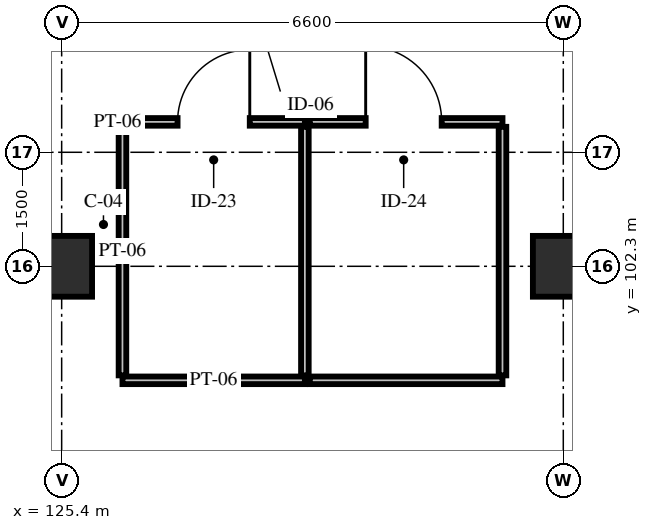
"""IFC4 building model, lengths in metres.
Left out: names, types, materials, properties, quantities, classifications, styles, units other than length and angle.
Written with IfcOpenShell. Run it as: python <this file> out.ifc"""

import sys

from ifc_helpers import new_model, si_unit, direction, frame, frame_2d, origin, origin_2d, place, context, subcontext, project, spatial, rectangle, extrude, element, fill, save


model = new_model("IFC4")
c1 = context("Model", 3, precision=1e-05, world=origin(), true_north=direction((0.0, 1.0)))
c2 = subcontext(c1, "Body", "Model", "MODEL_VIEW")
j1 = project(units=[si_unit("LENGTHUNIT", "METRE"), si_unit("PLANEANGLEUNIT", "RADIAN")], contexts=[c1])
p1 = place(None, origin())
s1 = spatial("IfcSite", under=j1, at=p1, CompositionType="ELEMENT")
p2 = place(p1, origin())
s2 = spatial("IfcBuilding", under=s1, at=p2, CompositionType="ELEMENT")
p3 = place(p2, frame((0.0, 0.0, 10.2)))
s3 = spatial("IfcBuildingStorey", under=s2, at=p3, CompositionType="ELEMENT", Elevation=10.2)
for number, where, z_axis, x_axis in (
    (1, (125.4, 102.3, 0.0), (0.0, 0.0, 1.0), (1.0, 0.0, 0.0)),
    (2, (132.0, 102.3, 0.0), (0.0, 0.0, 1.0), (1.0, 0.0, 0.0)),
):
    element("IfcColumn", number, at=place(p3, frame(where, z_axis=z_axis, x_axis=x_axis)), inside=s3, PredefinedType="COLUMN", context=c2, shape_type="SweptSolid", body=[
        extrude(rectangle(XDim=0.8, YDim=0.8, at=origin_2d()), origin(), (0.0, 0.0, 1.0), 4.8),
    ])
p4 = place(p3, frame((126.2, 100.8, 0.0), z_axis=(0.0, 0.0, 1.0), x_axis=(1.0, 0.0, 0.0)))
e3 = element("IfcWall", 3, at=p4, inside=s3, PredefinedType="PARTITIONING", context=c2, shape_type="SweptSolid", body=[
    extrude(rectangle(XDim=2.4, YDim=0.1, at=frame_2d((1.2, 0.0))), origin(), (0.0, 0.0, 1.0), 4.44),
])
p5 = place(p3, frame((126.2, 104.2, 0.0), z_axis=(0.0, 0.0, 1.0), x_axis=(1.0, 0.0, 0.0)))
e4 = element("IfcWall", 4, at=p5, inside=s3, PredefinedType="PARTITIONING", context=c2, shape_type="SweptSolid", body=[
    extrude(rectangle(XDim=2.4, YDim=0.1, at=frame_2d((1.2, 0.0))), origin(), (0.0, 0.0, 1.0), 4.245),
])
p6 = place(p5, frame((0.725, 0.0, 0.0)))
e5 = element("IfcOpeningElement", 5, at=p6, cuts=e4, PredefinedType="OPENING", context=c2, shape_type="SweptSolid", body=[
    extrude(rectangle(XDim=0.95, YDim=2.15, at=frame_2d((0.475, 1.075))), frame((0.0, 0.065, 0.0), z_axis=(0.0, -1.0, 0.0), x_axis=(1.0, 0.0, 0.0)), (0.0, 0.0, 1.0), 0.13),
])
for number, where, z_axis, x_axis in (
    (6, (126.2, 100.865, 0.0), (0.0, 0.0, 1.0), (0.0, 1.0, 0.0)),
    (7, (128.6, 100.865, 0.0), (0.0, 0.0, 1.0), (0.0, 1.0, 0.0)),
):
    element("IfcWall", number, at=place(p3, frame(where, z_axis=z_axis, x_axis=x_axis)), inside=s3, PredefinedType="PARTITIONING", context=c2, shape_type="SweptSolid", body=[
        extrude(rectangle(XDim=3.27, YDim=0.1, at=frame_2d((1.635, 0.0))), origin(), (0.0, 0.0, 1.0), 4.065),
    ])
p7 = place(p3, frame((128.665, 100.8, 0.0), z_axis=(0.0, 0.0, 1.0), x_axis=(1.0, 0.0, 0.0)))
e8 = element("IfcWall", 8, at=p7, inside=s3, PredefinedType="PARTITIONING", context=c2, shape_type="SweptSolid", body=[
    extrude(rectangle(XDim=2.535, YDim=0.1, at=frame_2d((1.268, 0.0))), origin(), (0.0, 0.0, 1.0), 4.44),
])
p8 = place(p3, frame((128.665, 104.2, 0.0), z_axis=(0.0, 0.0, 1.0), x_axis=(1.0, 0.0, 0.0)))
e9 = element("IfcWall", 9, at=p8, inside=s3, PredefinedType="PARTITIONING", context=c2, shape_type="SweptSolid", body=[
    extrude(rectangle(XDim=2.535, YDim=0.1, at=frame_2d((1.268, 0.0))), origin(), (0.0, 0.0, 1.0), 4.245),
])
p9 = place(p8, frame((0.735, 0.0, 0.0)))
e10 = element("IfcOpeningElement", 10, at=p9, cuts=e9, PredefinedType="OPENING", context=c2, shape_type="SweptSolid", body=[
    extrude(rectangle(XDim=1.0, YDim=2.15, at=frame_2d((0.5, 1.075))), frame((0.0, 0.065, 0.0), z_axis=(0.0, -1.0, 0.0), x_axis=(1.0, 0.0, 0.0)), (0.0, 0.0, 1.0), 0.13),
])
p10 = place(p3, frame((131.2, 100.865, 0.0), z_axis=(0.0, 0.0, 1.0), x_axis=(0.0, 1.0, 0.0)))
e11 = element("IfcWall", 11, at=p10, inside=s3, PredefinedType="PARTITIONING", context=c2, shape_type="SweptSolid", body=[
    extrude(rectangle(XDim=3.27, YDim=0.1, at=frame_2d((1.635, 0.0))), origin(), (0.0, 0.0, 1.0), 4.065),
])
p11 = place(p6, origin())
e12 = element("IfcDoor", 12, at=p11, inside=s3, OperationType="SINGLE_SWING_RIGHT", PredefinedType="DOOR", context=c2, shape_type="SweptSolid", body=[
    extrude(rectangle(XDim=0.95, YDim=2.15, at=frame_2d((0.475, 1.075))), frame((0.0, 0.025, 0.0), z_axis=(0.0, -1.0, 0.0), x_axis=(1.0, 0.0, 0.0)), (0.0, 0.0, 1.0), 0.05),
])
fill(e5, e12)
p12 = place(p9, origin())
e13 = element("IfcDoor", 13, at=p12, inside=s3, OperationType="SINGLE_SWING_LEFT", PredefinedType="DOOR", context=c2, shape_type="SweptSolid", body=[
    extrude(rectangle(XDim=1.0, YDim=2.15, at=frame_2d((0.5, 1.075))), frame((0.0, 0.025, 0.0), z_axis=(0.0, -1.0, 0.0), x_axis=(1.0, 0.0, 0.0)), (0.0, 0.0, 1.0), 0.05),
])
fill(e10, e13)
save(model, sys.argv[1])
